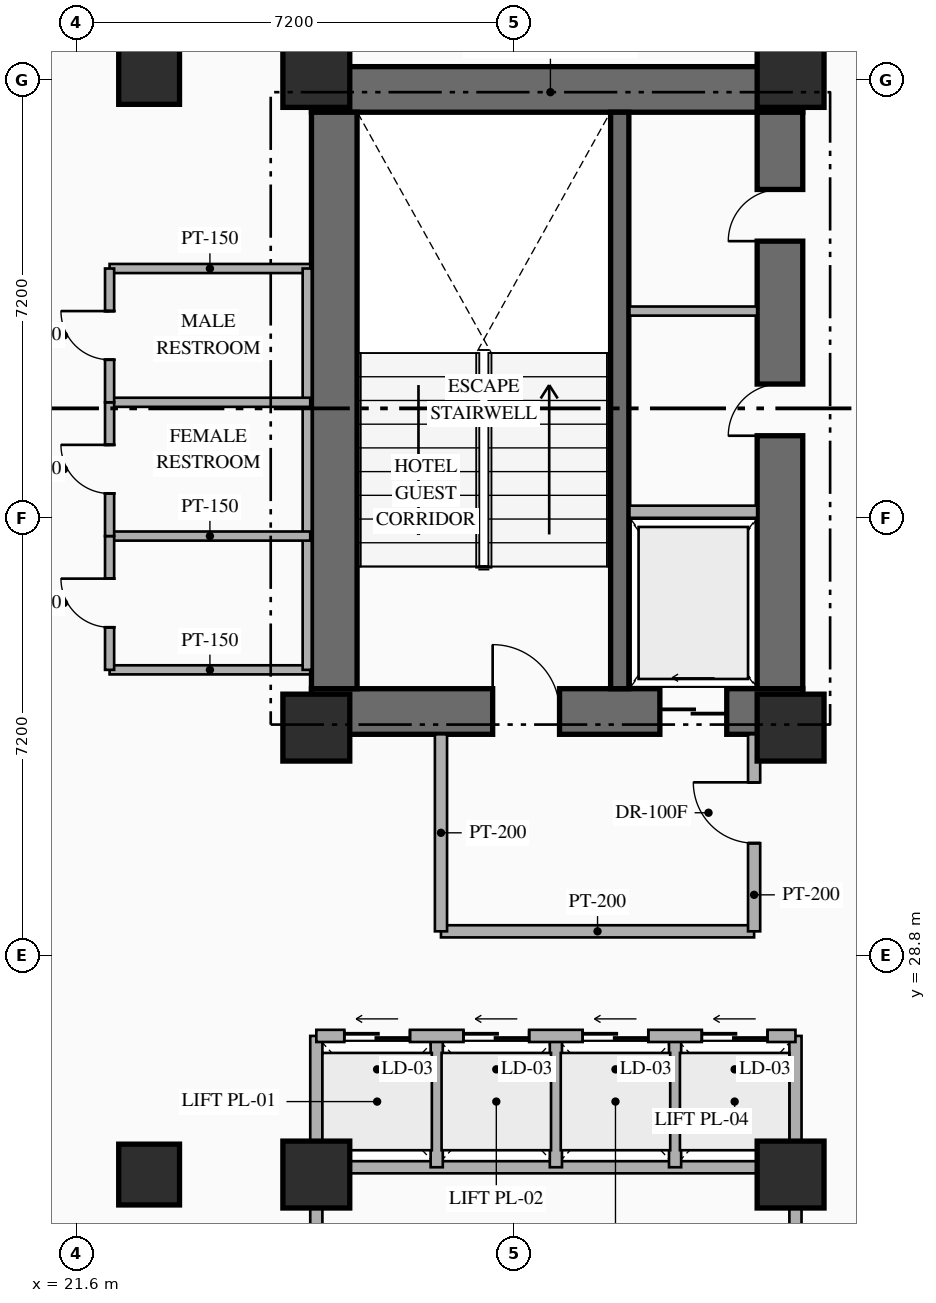
"""IFC4 building model, lengths in metres.
Left out: names, types, materials, properties, quantities, classifications, styles, units other than length and angle.
Written with IfcOpenShell. Run it as: python <this file> out.ifc"""

import sys

from ifc_helpers import new_model, si_unit, direction, frame, frame_2d, origin, origin_2d, place, context, subcontext, project, spatial, rectangle, hollow_rectangle, extrude, element, fill, save


model = new_model("IFC4")
c1 = context("Model", 3, precision=1e-05, world=origin(), true_north=direction((0.0, 1.0)))
c2 = subcontext(c1, "Body", "Model", "MODEL_VIEW")
j1 = project(units=[si_unit("LENGTHUNIT", "METRE"), si_unit("PLANEANGLEUNIT", "RADIAN")], contexts=[c1])
p1 = place(None, origin())
s1 = spatial("IfcSite", under=j1, at=p1, CompositionType="ELEMENT")
p2 = place(p1, origin())
s2 = spatial("IfcBuilding", under=s1, at=p2, CompositionType="ELEMENT")
p3 = place(p2, frame((0.0, 0.0, 66.75)))
s3 = spatial("IfcBuildingStorey", under=s2, at=p3, CompositionType="ELEMENT", Elevation=66.75)
p4 = place(p3, frame((25.47, 32.815, 0.0), z_axis=(0.0, 0.0, 1.0), x_axis=(1.0, 0.0, 0.0)))
e1 = element("IfcWall", 1, at=p4, inside=s3, PredefinedType="SHEAR", context=c2, shape_type="SweptSolid", body=[
    extrude(rectangle(XDim=8.08, YDim=0.75, at=frame_2d((4.04, 0.0))), origin(), (0.0, 0.0, 1.0), 3.35),
])
p5 = place(p4, frame((2.98, 0.0, 0.0)))
e2 = element("IfcOpeningElement", 2, at=p5, cuts=e1, PredefinedType="OPENING", context=c2, shape_type="SweptSolid", body=[
    extrude(rectangle(XDim=1.1, YDim=2.2, at=frame_2d((0.55, 1.1))), frame((0.0, 0.385, 0.0), z_axis=(0.0, -1.0, 0.0), x_axis=(1.0, 0.0, 0.0)), (0.0, 0.0, 1.0), 0.77),
])
p6 = place(p4, frame((5.73, 0.0, 0.0)))
e3 = element("IfcOpeningElement", 3, at=p6, cuts=e1, PredefinedType="OPENING", context=c2, shape_type="SweptSolid", body=[
    extrude(rectangle(XDim=1.1, YDim=2.15, at=frame_2d((0.55, 1.075))), frame((0.0, 0.385, 0.0), z_axis=(0.0, -1.0, 0.0), x_axis=(1.0, 0.0, 0.0)), (0.0, 0.0, 1.0), 0.77),
])
p7 = place(p3, frame((25.47, 43.045, 0.0), z_axis=(0.0, 0.0, 1.0), x_axis=(1.0, 0.0, 0.0)))
e4 = element("IfcWall", 4, at=p7, inside=s3, PredefinedType="SHEAR", context=c2, shape_type="SweptSolid", body=[
    extrude(rectangle(XDim=8.08, YDim=0.75, at=frame_2d((4.04, 0.0))), origin(), (0.0, 0.0, 1.0), 3.35),
])
p8 = place(p3, frame((25.845, 33.19, 0.0), z_axis=(0.0, 0.0, 1.0), x_axis=(0.0, 1.0, 0.0)))
e5 = element("IfcWall", 5, at=p8, inside=s3, PredefinedType="SHEAR", context=c2, shape_type="SweptSolid", body=[
    extrude(rectangle(XDim=9.48, YDim=0.75, at=frame_2d((4.74, 0.0))), origin(), (0.0, 0.0, 1.0), 3.35),
])
p9 = place(p3, frame((33.175, 33.19, 0.0), z_axis=(0.0, 0.0, 1.0), x_axis=(0.0, 1.0, 0.0)))
e6 = element("IfcWall", 6, at=p9, inside=s3, PredefinedType="SHEAR", context=c2, shape_type="SweptSolid", body=[
    extrude(rectangle(XDim=9.48, YDim=0.75, at=frame_2d((4.74, 0.0))), origin(), (0.0, 0.0, 1.0), 3.35),
])
p10 = place(p9, frame((4.16, 0.0, 0.0)))
e7 = element("IfcOpeningElement", 7, at=p10, cuts=e6, PredefinedType="OPENING", context=c2, shape_type="SweptSolid", body=[
    extrude(rectangle(XDim=0.85, YDim=2.08, at=frame_2d((0.425, 1.04))), frame((0.0, 0.385, 0.0), z_axis=(0.0, -1.0, 0.0), x_axis=(1.0, 0.0, 0.0)), (0.0, 0.0, 1.0), 0.77),
])
p11 = place(p9, frame((7.36, 0.0, 0.0)))
e8 = element("IfcOpeningElement", 8, at=p11, cuts=e6, PredefinedType="OPENING", context=c2, shape_type="SweptSolid", body=[
    extrude(rectangle(XDim=0.85, YDim=2.08, at=frame_2d((0.425, 1.04))), frame((0.0, 0.385, 0.0), z_axis=(0.0, -1.0, 0.0), x_axis=(1.0, 0.0, 0.0)), (0.0, 0.0, 1.0), 0.77),
])
p12 = place(p3, frame((30.54, 33.19, 0.0), z_axis=(0.0, 0.0, 1.0), x_axis=(0.0, 1.0, 0.0)))
e9 = element("IfcWall", 9, at=p12, inside=s3, PredefinedType="SHEAR", context=c2, shape_type="SweptSolid", body=[
    extrude(rectangle(XDim=9.48, YDim=0.3, at=frame_2d((4.74, 0.0))), origin(), (0.0, 0.0, 1.0), 3.35),
])
for number, where, z_axis, x_axis in (
    (10, (25.55, 32.55, 0.0), (0.0, 0.0, 1.0), (1.0, 0.0, 0.0)),
    (11, (33.35, 32.55, 0.0), (0.0, 0.0, 1.0), (1.0, 0.0, 0.0)),
    (12, (25.55, 43.3, 0.0), (0.0, 0.0, 1.0), (1.0, 0.0, 0.0)),
    (13, (33.35, 43.3, 0.0), (0.0, 0.0, 1.0), (1.0, 0.0, 0.0)),
):
    element("IfcColumn", number, at=place(p3, frame(where, z_axis=z_axis, x_axis=x_axis)), inside=s3, PredefinedType="COLUMN", context=c2, shape_type="SweptSolid", body=[
        extrude(rectangle(XDim=1.1, YDim=1.1, at=origin_2d()), origin(), (0.0, 0.0, 1.0), 3.35),
    ])
for number, where, z_axis, x_axis in (
    (14, (25.55, 25.2, 0.0), (0.0, 0.0, 1.0), (1.0, 0.0, 0.0)),
    (15, (33.35, 25.2, 0.0), (0.0, 0.0, 1.0), (1.0, 0.0, 0.0)),
):
    element("IfcColumn", number, at=place(p3, frame(where, z_axis=z_axis, x_axis=x_axis)), inside=s3, PredefinedType="COLUMN", context=c2, shape_type="SweptSolid", body=[
        extrude(hollow_rectangle(XDim=1.1, YDim=1.1, WallThickness=0.04, at=origin_2d()), origin(), (0.0, 0.0, 1.0), 3.35),
    ])
for number, where, z_axis, x_axis in (
    (16, (22.8, 25.2, 0.0), (0.0, 0.0, 1.0), (1.0, 0.0, 0.0)),
    (17, (22.8, 43.3, 0.0), (0.0, 0.0, 1.0), (1.0, 0.0, 0.0)),
):
    element("IfcColumn", number, at=place(p3, frame(where, z_axis=z_axis, x_axis=x_axis)), inside=s3, PredefinedType="COLUMN", context=c2, shape_type="SweptSolid", body=[
        extrude(hollow_rectangle(XDim=1.0, YDim=1.0, WallThickness=0.038, at=origin_2d()), origin(), (0.0, 0.0, 1.0), 3.35),
    ])
p13 = place(p3, frame((30.7, 36.1, 0.0), z_axis=(0.0, 0.0, 1.0), x_axis=(1.0, 0.0, 0.0)))
e18 = element("IfcWall", 18, at=p13, inside=s3, PredefinedType="STANDARD", context=c2, shape_type="SweptSolid", body=[
    extrude(rectangle(XDim=2.1, YDim=0.2, at=frame_2d((1.05, 0.0))), origin(), (0.0, 0.0, 1.0), 3.09),
])
p14 = place(p3, frame((30.7, 39.4, 0.0), z_axis=(0.0, 0.0, 1.0), x_axis=(1.0, 0.0, 0.0)))
e19 = element("IfcWall", 19, at=p14, inside=s3, PredefinedType="PARTITIONING", context=c2, shape_type="SweptSolid", body=[
    extrude(rectangle(XDim=2.1, YDim=0.15, at=frame_2d((1.05, 0.0))), origin(), (0.0, 0.0, 1.0), 3.09),
])
p15 = place(p3, frame((27.6, 29.2, 0.0), z_axis=(0.0, 0.0, 1.0), x_axis=(1.0, 0.0, 0.0)))
e20 = element("IfcWall", 20, at=p15, inside=s3, PredefinedType="STANDARD", context=c2, shape_type="SweptSolid", body=[
    extrude(rectangle(XDim=5.15, YDim=0.2, at=frame_2d((2.575, 0.0))), origin(), (0.0, 0.0, 1.0), 3.09),
])
p16 = place(p3, frame((27.6, 29.2, 0.0), z_axis=(0.0, 0.0, 1.0), x_axis=(0.0, 1.0, 0.0)))
e21 = element("IfcWall", 21, at=p16, inside=s3, PredefinedType="STANDARD", context=c2, shape_type="SweptSolid", body=[
    extrude(rectangle(XDim=3.24, YDim=0.2, at=frame_2d((1.62, 0.0))), origin(), (0.0, 0.0, 1.0), 3.09),
])
p17 = place(p3, frame((32.75, 29.2, 0.0), z_axis=(0.0, 0.0, 1.0), x_axis=(0.0, 1.0, 0.0)))
e22 = element("IfcWall", 22, at=p17, inside=s3, PredefinedType="STANDARD", context=c2, shape_type="SweptSolid", body=[
    extrude(rectangle(XDim=3.24, YDim=0.2, at=frame_2d((1.62, 0.0))), origin(), (0.0, 0.0, 1.0), 3.09),
])
p18 = place(p17, frame((1.45, 0.0, 0.0)))
e23 = element("IfcOpeningElement", 23, at=p18, cuts=e22, PredefinedType="OPENING", context=c2, shape_type="SweptSolid", body=[
    extrude(rectangle(XDim=1.0, YDim=2.2, at=frame_2d((0.5, 1.1))), frame((0.0, 0.11, 0.0), z_axis=(0.0, -1.0, 0.0), x_axis=(1.0, 0.0, 0.0)), (0.0, 0.0, 1.0), 0.22),
])
for number, where, z_axis, x_axis in (
    (24, (25.55, 23.4, 0.0), (0.0, 0.0, 1.0), (0.0, 1.0, 0.0)),
    (25, (33.43, 23.4, 0.0), (0.0, 0.0, 1.0), (0.0, 1.0, 0.0)),
):
    element("IfcWall", number, at=place(p3, frame(where, z_axis=z_axis, x_axis=x_axis)), inside=s3, PredefinedType="STANDARD", context=c2, shape_type="SweptSolid", body=[
        extrude(rectangle(XDim=4.08, YDim=0.2, at=frame_2d((2.04, 0.0))), origin(), (0.0, 0.0, 1.0), 2.425),
    ])
p19 = place(p3, frame((25.55, 25.32, 0.0), z_axis=(0.0, 0.0, 1.0), x_axis=(1.0, 0.0, 0.0)))
e26 = element("IfcWall", 26, at=p19, inside=s3, PredefinedType="STANDARD", context=c2, shape_type="SweptSolid", body=[
    extrude(rectangle(XDim=7.88, YDim=0.2, at=frame_2d((3.94, 0.0))), origin(), (0.0, 0.0, 1.0), 2.525),
])
for number, where, z_axis, x_axis in (
    (27, (27.53, 25.32, 0.0), (0.0, 0.0, 1.0), (0.0, 1.0, 0.0)),
    (28, (29.49, 25.32, 0.0), (0.0, 0.0, 1.0), (0.0, 1.0, 0.0)),
    (29, (31.45, 25.32, 0.0), (0.0, 0.0, 1.0), (0.0, 1.0, 0.0)),
):
    element("IfcWall", number, at=place(p3, frame(where, z_axis=z_axis, x_axis=x_axis)), inside=s3, PredefinedType="STANDARD", context=c2, shape_type="SweptSolid", body=[
        extrude(rectangle(XDim=2.16, YDim=0.2, at=frame_2d((1.08, 0.0))), origin(), (0.0, 0.0, 1.0), 3.09),
    ])
p20 = place(p3, frame((25.55, 27.48, 0.0), z_axis=(0.0, 0.0, 1.0), x_axis=(1.0, 0.0, 0.0)))
e30 = element("IfcWall", 30, at=p20, inside=s3, PredefinedType="STANDARD", context=c2, shape_type="SweptSolid", body=[
    extrude(rectangle(XDim=7.88, YDim=0.2, at=frame_2d((3.94, 0.0))), origin(), (0.0, 0.0, 1.0), 3.09),
])
p21 = place(p20, frame((0.46, 0.0, 0.0)))
e31 = element("IfcOpeningElement", 31, at=p21, cuts=e30, PredefinedType="OPENING", context=c2, shape_type="SweptSolid", body=[
    extrude(rectangle(XDim=1.08, YDim=2.15, at=frame_2d((0.54, 1.075))), frame((0.0, 0.11, 0.0), z_axis=(0.0, -1.0, 0.0), x_axis=(1.0, 0.0, 0.0)), (0.0, 0.0, 1.0), 0.22),
])
p22 = place(p20, frame((2.42, 0.0, 0.0)))
e32 = element("IfcOpeningElement", 32, at=p22, cuts=e30, PredefinedType="OPENING", context=c2, shape_type="SweptSolid", body=[
    extrude(rectangle(XDim=1.08, YDim=2.15, at=frame_2d((0.54, 1.075))), frame((0.0, 0.11, 0.0), z_axis=(0.0, -1.0, 0.0), x_axis=(1.0, 0.0, 0.0)), (0.0, 0.0, 1.0), 0.22),
])
p23 = place(p20, frame((4.38, 0.0, 0.0)))
e33 = element("IfcOpeningElement", 33, at=p23, cuts=e30, PredefinedType="OPENING", context=c2, shape_type="SweptSolid", body=[
    extrude(rectangle(XDim=1.08, YDim=2.15, at=frame_2d((0.54, 1.075))), frame((0.0, 0.11, 0.0), z_axis=(0.0, -1.0, 0.0), x_axis=(1.0, 0.0, 0.0)), (0.0, 0.0, 1.0), 0.22),
])
p24 = place(p20, frame((6.34, 0.0, 0.0)))
e34 = element("IfcOpeningElement", 34, at=p24, cuts=e30, PredefinedType="OPENING", context=c2, shape_type="SweptSolid", body=[
    extrude(rectangle(XDim=1.08, YDim=2.15, at=frame_2d((0.54, 1.075))), frame((0.0, 0.11, 0.0), z_axis=(0.0, -1.0, 0.0), x_axis=(1.0, 0.0, 0.0)), (0.0, 0.0, 1.0), 0.22),
])
for number, where, z_axis, x_axis in (
    (35, (22.15, 33.5, 0.0), (0.0, 0.0, 1.0), (1.0, 0.0, 0.0)),
    (36, (22.15, 40.1, 0.0), (0.0, 0.0, 1.0), (1.0, 0.0, 0.0)),
):
    element("IfcWall", number, at=place(p3, frame(where, z_axis=z_axis, x_axis=x_axis)), inside=s3, PredefinedType="PARTITIONING", context=c2, shape_type="SweptSolid", body=[
        extrude(rectangle(XDim=3.3, YDim=0.15, at=frame_2d((1.65, 0.0))), origin(), (0.0, 0.0, 1.0), 3.09),
    ])
p25 = place(p3, frame((25.4, 33.5, 0.0), z_axis=(0.0, 0.0, 1.0), x_axis=(0.0, 1.0, 0.0)))
e37 = element("IfcWall", 37, at=p25, inside=s3, PredefinedType="PARTITIONING", context=c2, shape_type="SweptSolid", body=[
    extrude(rectangle(XDim=6.6, YDim=0.15, at=frame_2d((3.3, 0.0))), origin(), (0.0, 0.0, 1.0), 3.09),
])
for number, where, z_axis, x_axis in (
    (38, (22.15, 35.7, 0.0), (0.0, 0.0, 1.0), (1.0, 0.0, 0.0)),
    (39, (22.15, 37.9, 0.0), (0.0, 0.0, 1.0), (1.0, 0.0, 0.0)),
):
    element("IfcWall", number, at=place(p3, frame(where, z_axis=z_axis, x_axis=x_axis)), inside=s3, PredefinedType="PARTITIONING", context=c2, shape_type="SweptSolid", body=[
        extrude(rectangle(XDim=3.3, YDim=0.15, at=frame_2d((1.65, 0.0))), origin(), (0.0, 0.0, 1.0), 3.09),
    ])
p26 = place(p3, frame((22.15, 33.5, 0.0), z_axis=(0.0, 0.0, 1.0), x_axis=(0.0, 1.0, 0.0)))
e40 = element("IfcWall", 40, at=p26, inside=s3, PredefinedType="PARTITIONING", context=c2, shape_type="SweptSolid", body=[
    extrude(rectangle(XDim=2.2, YDim=0.15, at=frame_2d((1.1, 0.0))), origin(), (0.0, 0.0, 1.0), 3.09),
])
p27 = place(p26, frame((0.7, 0.0, 0.0)))
e41 = element("IfcOpeningElement", 41, at=p27, cuts=e40, PredefinedType="OPENING", context=c2, shape_type="SweptSolid", body=[
    extrude(rectangle(XDim=0.8, YDim=2.06, at=frame_2d((0.4, 1.03))), frame((0.0, 0.085, 0.0), z_axis=(0.0, -1.0, 0.0), x_axis=(1.0, 0.0, 0.0)), (0.0, 0.0, 1.0), 0.17),
])
p28 = place(p3, frame((22.15, 35.7, 0.0), z_axis=(0.0, 0.0, 1.0), x_axis=(0.0, 1.0, 0.0)))
e42 = element("IfcWall", 42, at=p28, inside=s3, PredefinedType="PARTITIONING", context=c2, shape_type="SweptSolid", body=[
    extrude(rectangle(XDim=2.2, YDim=0.15, at=frame_2d((1.1, 0.0))), origin(), (0.0, 0.0, 1.0), 3.09),
])
p29 = place(p28, frame((0.7, 0.0, 0.0)))
e43 = element("IfcOpeningElement", 43, at=p29, cuts=e42, PredefinedType="OPENING", context=c2, shape_type="SweptSolid", body=[
    extrude(rectangle(XDim=0.8, YDim=2.06, at=frame_2d((0.4, 1.03))), frame((0.0, 0.085, 0.0), z_axis=(0.0, -1.0, 0.0), x_axis=(1.0, 0.0, 0.0)), (0.0, 0.0, 1.0), 0.17),
])
p30 = place(p3, frame((22.15, 37.9, 0.0), z_axis=(0.0, 0.0, 1.0), x_axis=(0.0, 1.0, 0.0)))
e44 = element("IfcWall", 44, at=p30, inside=s3, PredefinedType="PARTITIONING", context=c2, shape_type="SweptSolid", body=[
    extrude(rectangle(XDim=2.2, YDim=0.15, at=frame_2d((1.1, 0.0))), origin(), (0.0, 0.0, 1.0), 3.09),
])
p31 = place(p30, frame((0.7, 0.0, 0.0)))
e45 = element("IfcOpeningElement", 45, at=p31, cuts=e44, PredefinedType="OPENING", context=c2, shape_type="SweptSolid", body=[
    extrude(rectangle(XDim=0.8, YDim=2.06, at=frame_2d((0.4, 1.03))), frame((0.0, 0.085, 0.0), z_axis=(0.0, -1.0, 0.0), x_axis=(1.0, 0.0, 0.0)), (0.0, 0.0, 1.0), 0.17),
])
p32 = place(p3, frame((33.384, 17.312, 0.0), z_axis=(0.0, 0.0, 1.0), x_axis=(0.600008743659, 0.799993442181, 0.0)))
e46 = element("IfcWall", 46, at=p32, inside=s3, PredefinedType="PARTITIONING", context=c2, shape_type="SweptSolid", body=[
    extrude(rectangle(XDim=8.935, YDim=0.15, at=frame_2d((4.468, 0.0))), origin(), (0.0, 0.0, 1.0), 3.09),
])
p33 = place(p5, origin())
e47 = element("IfcDoor", 47, at=p33, inside=s3, OperationType="SINGLE_SWING_LEFT", PredefinedType="DOOR", context=c2, shape_type="SweptSolid", body=[
    extrude(rectangle(XDim=1.1, YDim=2.2, at=frame_2d((0.55, 1.1))), frame((0.0, 0.025, 0.0), z_axis=(0.0, -1.0, 0.0), x_axis=(1.0, 0.0, 0.0)), (0.0, 0.0, 1.0), 0.05),
])
fill(e2, e47)
p34 = place(p6, origin())
e48 = element("IfcDoor", 48, at=p34, inside=s3, OperationType="SLIDING_TO_LEFT", PredefinedType="USERDEFINED", context=c2, shape_type="SweptSolid", body=[
    extrude(rectangle(XDim=1.1, YDim=2.15, at=frame_2d((0.55, 1.075))), frame((0.0, 0.025, 0.0), z_axis=(0.0, -1.0, 0.0), x_axis=(1.0, 0.0, 0.0)), (0.0, 0.0, 1.0), 0.05),
])
fill(e3, e48)
p35 = place(p10, origin())
e49 = element("IfcDoor", 49, at=p35, inside=s3, OperationType="SINGLE_SWING_LEFT", PredefinedType="DOOR", context=c2, shape_type="SweptSolid", body=[
    extrude(rectangle(XDim=0.85, YDim=2.08, at=frame_2d((0.425, 1.04))), frame((0.0, 0.025, 0.0), z_axis=(0.0, -1.0, 0.0), x_axis=(1.0, 0.0, 0.0)), (0.0, 0.0, 1.0), 0.05),
])
fill(e7, e49)
p36 = place(p11, origin())
e50 = element("IfcDoor", 50, at=p36, inside=s3, OperationType="SINGLE_SWING_LEFT", PredefinedType="DOOR", context=c2, shape_type="SweptSolid", body=[
    extrude(rectangle(XDim=0.85, YDim=2.08, at=frame_2d((0.425, 1.04))), frame((0.0, 0.025, 0.0), z_axis=(0.0, -1.0, 0.0), x_axis=(1.0, 0.0, 0.0)), (0.0, 0.0, 1.0), 0.05),
])
fill(e8, e50)
p37 = place(p18, origin())
e51 = element("IfcDoor", 51, at=p37, inside=s3, OperationType="SINGLE_SWING_RIGHT", PredefinedType="DOOR", context=c2, shape_type="SweptSolid", body=[
    extrude(rectangle(XDim=1.0, YDim=2.2, at=frame_2d((0.5, 1.1))), frame((0.0, 0.025, 0.0), z_axis=(0.0, -1.0, 0.0), x_axis=(1.0, 0.0, 0.0)), (0.0, 0.0, 1.0), 0.05),
])
fill(e23, e51)
p38 = place(p21, origin())
e52 = element("IfcDoor", 52, at=p38, inside=s3, OperationType="SLIDING_TO_LEFT", PredefinedType="USERDEFINED", context=c2, shape_type="SweptSolid", body=[
    extrude(rectangle(XDim=1.08, YDim=2.15, at=frame_2d((0.54, 1.075))), frame((0.0, 0.025, 0.0), z_axis=(0.0, -1.0, 0.0), x_axis=(1.0, 0.0, 0.0)), (0.0, 0.0, 1.0), 0.05),
])
fill(e31, e52)
p39 = place(p22, origin())
e53 = element("IfcDoor", 53, at=p39, inside=s3, OperationType="SLIDING_TO_LEFT", PredefinedType="USERDEFINED", context=c2, shape_type="SweptSolid", body=[
    extrude(rectangle(XDim=1.08, YDim=2.15, at=frame_2d((0.54, 1.075))), frame((0.0, 0.025, 0.0), z_axis=(0.0, -1.0, 0.0), x_axis=(1.0, 0.0, 0.0)), (0.0, 0.0, 1.0), 0.05),
])
fill(e32, e53)
p40 = place(p23, origin())
e54 = element("IfcDoor", 54, at=p40, inside=s3, OperationType="SLIDING_TO_LEFT", PredefinedType="USERDEFINED", context=c2, shape_type="SweptSolid", body=[
    extrude(rectangle(XDim=1.08, YDim=2.15, at=frame_2d((0.54, 1.075))), frame((0.0, 0.025, 0.0), z_axis=(0.0, -1.0, 0.0), x_axis=(1.0, 0.0, 0.0)), (0.0, 0.0, 1.0), 0.05),
])
fill(e33, e54)
p41 = place(p24, origin())
e55 = element("IfcDoor", 55, at=p41, inside=s3, OperationType="SLIDING_TO_LEFT", PredefinedType="USERDEFINED", context=c2, shape_type="SweptSolid", body=[
    extrude(rectangle(XDim=1.08, YDim=2.15, at=frame_2d((0.54, 1.075))), frame((0.0, 0.025, 0.0), z_axis=(0.0, -1.0, 0.0), x_axis=(1.0, 0.0, 0.0)), (0.0, 0.0, 1.0), 0.05),
])
fill(e34, e55)
p42 = place(p27, origin())
e56 = element("IfcDoor", 56, at=p42, inside=s3, OperationType="SINGLE_SWING_RIGHT", PredefinedType="DOOR", context=c2, shape_type="SweptSolid", body=[
    extrude(rectangle(XDim=0.8, YDim=2.06, at=frame_2d((0.4, 1.03))), frame((0.0, 0.025, 0.0), z_axis=(0.0, -1.0, 0.0), x_axis=(1.0, 0.0, 0.0)), (0.0, 0.0, 1.0), 0.05),
])
fill(e41, e56)
p43 = place(p29, origin())
e57 = element("IfcDoor", 57, at=p43, inside=s3, OperationType="SINGLE_SWING_RIGHT", PredefinedType="DOOR", context=c2, shape_type="SweptSolid", body=[
    extrude(rectangle(XDim=0.8, YDim=2.06, at=frame_2d((0.4, 1.03))), frame((0.0, 0.025, 0.0), z_axis=(0.0, -1.0, 0.0), x_axis=(1.0, 0.0, 0.0)), (0.0, 0.0, 1.0), 0.05),
])
fill(e43, e57)
p44 = place(p31, origin())
e58 = element("IfcDoor", 58, at=p44, inside=s3, OperationType="SINGLE_SWING_RIGHT", PredefinedType="DOOR", context=c2, shape_type="SweptSolid", body=[
    extrude(rectangle(XDim=0.8, YDim=2.06, at=frame_2d((0.4, 1.03))), frame((0.0, 0.025, 0.0), z_axis=(0.0, -1.0, 0.0), x_axis=(1.0, 0.0, 0.0)), (0.0, 0.0, 1.0), 0.05),
])
fill(e45, e58)
save(model, sys.argv[1])
